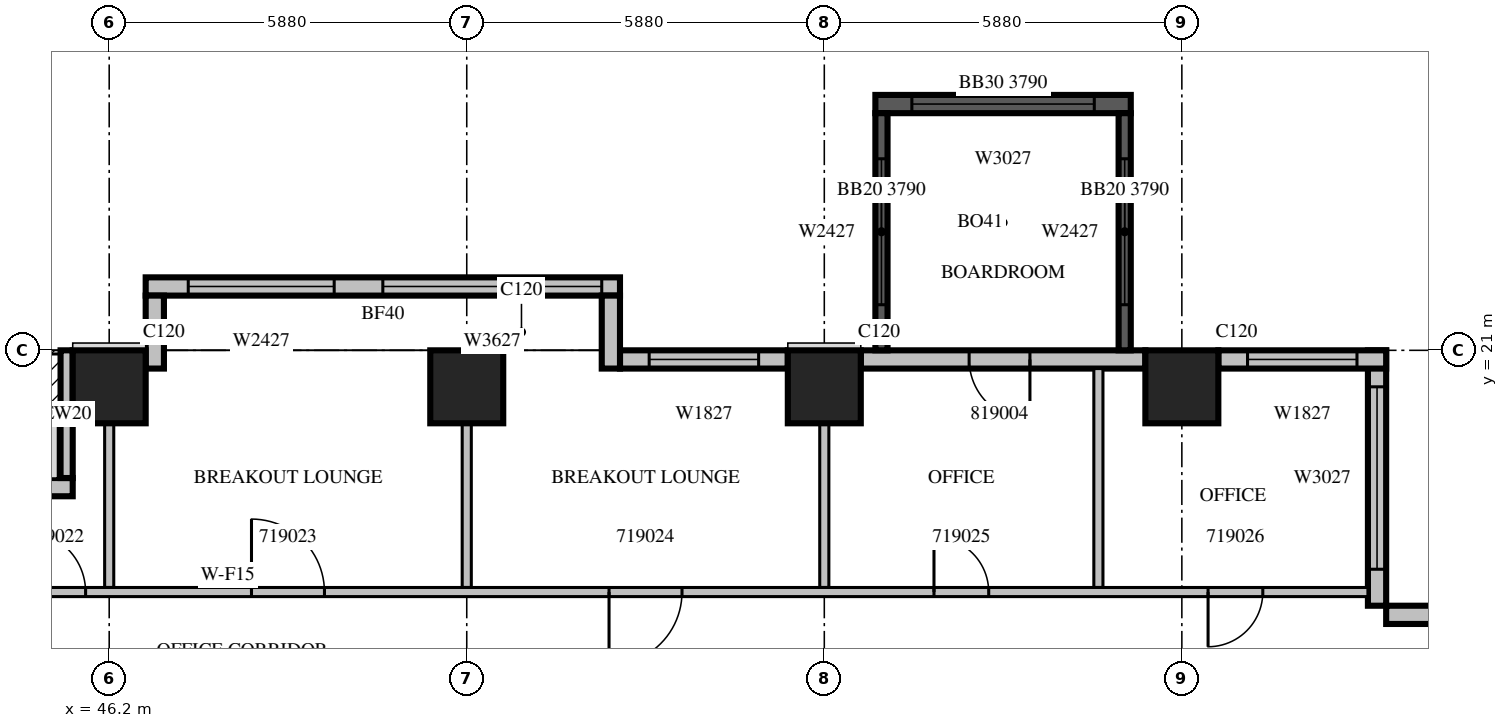
"""IFC4 building model, lengths in metres.
Left out: names, types, materials, properties, quantities, classifications, styles, units other than length and angle.
Written with IfcOpenShell. Run it as: python <this file> out.ifc"""

import sys

from ifc_helpers import new_model, si_unit, direction, frame, frame_2d, origin, origin_2d, place, context, subcontext, project, spatial, rectangle, extrude, source, transform, mapped, element, fill, save


model = new_model("IFC4")
c1 = context("Model", 3, precision=1e-05, world=origin(), true_north=direction((0.0, 1.0)))
c2 = subcontext(c1, "Body", "Model", "MODEL_VIEW")
j1 = project(units=[si_unit("LENGTHUNIT", "METRE"), si_unit("PLANEANGLEUNIT", "RADIAN")], contexts=[c1])
p1 = place(None, origin())
s1 = spatial("IfcSite", under=j1, at=p1, CompositionType="ELEMENT")
p2 = place(p1, origin())
s2 = spatial("IfcBuilding", under=s1, at=p2, CompositionType="ELEMENT")
p3 = place(p2, frame((0.0, 0.0, 90.9)))
s3 = spatial("IfcBuildingStorey", under=s2, at=p3, CompositionType="ELEMENT", Elevation=90.9)
m1 = source(origin(), c2, "Body", "SweptSolid", [
    extrude(rectangle(XDim=1.2, YDim=1.2, at=origin_2d()), origin(), (0.0, 0.0, 1.0), 4.2),
])
for number, where, z_axis, x_axis in (
    (1, (46.2, 20.4, 0.0), (0.0, 0.0, 1.0), (1.0, 0.0, 0.0)),
    (2, (52.08, 20.4, 0.0), (0.0, 0.0, 1.0), (1.0, 0.0, 0.0)),
    (3, (57.96, 20.4, 0.0), (0.0, 0.0, 1.0), (1.0, 0.0, 0.0)),
    (4, (63.84, 20.4, 0.0), (0.0, 0.0, 1.0), (1.0, 0.0, 0.0)),
):
    element("IfcColumn", number, at=place(p3, frame(where, z_axis=z_axis, x_axis=x_axis)), inside=s3, PredefinedType="COLUMN", context=c2, shape_type="MappedRepresentation", body=[
        mapped(m1, transform((0.0, 0.0, 0.0), scale=1.0)),
    ])
m2 = source(origin(), c2, "Body", "SweptSolid", [
    extrude(rectangle(XDim=4.2, YDim=0.3, at=frame_2d((2.1, 0.0))), origin(), (0.0, 0.0, 1.0), 3.8),
])
p4 = place(p3, frame((71.4, 16.65, 0.0), z_axis=(0.0, 0.0, 1.0), x_axis=(-1.0, 0.0, 0.0)))
e5 = element("IfcWall", 5, at=p4, inside=s3, PredefinedType="STANDARD", context=c2, shape_type="MappedRepresentation", body=[
    mapped(m2, transform((0.0, 0.0, 0.0), scale=1.0)),
])
m3 = source(origin(), c2, "Body", "SweptSolid", [
    extrude(rectangle(XDim=1.2, YDim=2.7, at=frame_2d((0.6, 1.35))), frame((0.0, 0.16, 0.0), z_axis=(0.0, -1.0, 0.0), x_axis=(1.0, 0.0, 0.0)), (0.0, 0.0, 1.0), 0.32),
])
p5 = place(p4, frame((0.66, 0.0, 0.6)))
e6 = element("IfcOpeningElement", 6, at=p5, cuts=e5, PredefinedType="OPENING", context=c2, shape_type="MappedRepresentation", body=[
    mapped(m3, transform((0.0, 0.0, 0.0), scale=1.0)),
])
p6 = place(p3, frame((67.05, 16.8, 0.0), z_axis=(0.0, 0.0, 1.0), x_axis=(0.0, 1.0, 0.0)))
e7 = element("IfcWall", 7, at=p6, inside=s3, PredefinedType="STANDARD", context=c2, shape_type="MappedRepresentation", body=[
    mapped(m2, transform((0.0, 0.0, 0.0), scale=1.0)),
])
m4 = source(origin(), c2, "Body", "SweptSolid", [
    extrude(rectangle(XDim=3.0, YDim=2.7, at=frame_2d((1.5, 1.35))), frame((0.0, 0.16, 0.0), z_axis=(0.0, -1.0, 0.0), x_axis=(1.0, 0.0, 0.0)), (0.0, 0.0, 1.0), 0.32),
])
p7 = place(p6, frame((0.6, 0.0, 0.6)))
e8 = element("IfcOpeningElement", 8, at=p7, cuts=e7, PredefinedType="OPENING", context=c2, shape_type="MappedRepresentation", body=[
    mapped(m4, transform((0.0, 0.0, 0.0), scale=1.0)),
])
m5 = source(origin(), c2, "Body", "SweptSolid", [
    extrude(rectangle(XDim=2.76, YDim=0.3, at=frame_2d((1.38, 0.0))), origin(), (0.0, 0.0, 1.0), 3.8),
])
p8 = place(p3, frame((67.2, 20.85, 0.0), z_axis=(0.0, 0.0, 1.0), x_axis=(-1.0, 0.0, 0.0)))
e9 = element("IfcWall", 9, at=p8, inside=s3, PredefinedType="STANDARD", context=c2, shape_type="MappedRepresentation", body=[
    mapped(m5, transform((0.0, 0.0, 0.0), scale=1.0)),
])
m6 = source(origin(), c2, "Body", "SweptSolid", [
    extrude(rectangle(XDim=1.8, YDim=2.7, at=frame_2d((0.9, 1.35))), frame((0.0, 0.16, 0.0), z_axis=(0.0, -1.0, 0.0), x_axis=(1.0, 0.0, 0.0)), (0.0, 0.0, 1.0), 0.32),
])
p9 = place(p8, frame((0.48, 0.0, 0.6)))
e10 = element("IfcOpeningElement", 10, at=p9, cuts=e9, PredefinedType="OPENING", context=c2, shape_type="MappedRepresentation", body=[
    mapped(m6, transform((0.0, 0.0, 0.0), scale=1.0)),
])
m7 = source(origin(), c2, "Body", "SweptSolid", [
    extrude(rectangle(XDim=4.68, YDim=0.3, at=frame_2d((2.34, 0.0))), origin(), (0.0, 0.0, 1.0), 3.8),
])
p10 = place(p3, frame((63.24, 20.85, 0.0), z_axis=(0.0, 0.0, 1.0), x_axis=(-1.0, 0.0, 0.0)))
e11 = element("IfcWall", 11, at=p10, inside=s3, PredefinedType="STANDARD", context=c2, shape_type="MappedRepresentation", body=[
    mapped(m7, transform((0.0, 0.0, 0.0), scale=1.0)),
])
m8 = source(origin(), c2, "Body", "SweptSolid", [
    extrude(rectangle(XDim=1.0, YDim=2.1, at=frame_2d((0.5, 1.05))), frame((0.0, 0.16, 0.0), z_axis=(0.0, -1.0, 0.0), x_axis=(1.0, 0.0, 0.0)), (0.0, 0.0, 1.0), 0.32),
])
p11 = place(p10, frame((1.898, 0.0, 0.0)))
e12 = element("IfcOpeningElement", 12, at=p11, cuts=e11, PredefinedType="OPENING", context=c2, shape_type="MappedRepresentation", body=[
    mapped(m8, transform((0.0, 0.0, 0.0), scale=1.0)),
])
p12 = place(p3, frame((57.36, 20.85, 0.0), z_axis=(0.0, 0.0, 1.0), x_axis=(-1.0, 0.0, 0.0)))
e13 = element("IfcWall", 13, at=p12, inside=s3, PredefinedType="STANDARD", context=c2, shape_type="MappedRepresentation", body=[
    mapped(m5, transform((0.0, 0.0, 0.0), scale=1.0)),
])
p13 = place(p12, frame((0.48, 0.0, 0.6)))
e14 = element("IfcOpeningElement", 14, at=p13, cuts=e13, PredefinedType="OPENING", context=c2, shape_type="MappedRepresentation", body=[
    mapped(m6, transform((0.0, 0.0, 0.0), scale=1.0)),
])
p14 = place(p3, frame((54.6, 22.05, 0.0), z_axis=(0.0, 0.0, 1.0), x_axis=(-1.0, 0.0, 0.0)))
e15 = element("IfcWall", 15, at=p14, inside=s3, PredefinedType="STANDARD", context=c2, shape_type="SweptSolid", body=[
    extrude(rectangle(XDim=7.8, YDim=0.3, at=frame_2d((3.9, 0.0))), origin(), (0.0, 0.0, 1.0), 3.8),
])
m9 = source(origin(), c2, "Body", "SweptSolid", [
    extrude(rectangle(XDim=3.6, YDim=2.7, at=frame_2d((1.8, 1.35))), frame((0.0, 0.16, 0.0), z_axis=(0.0, -1.0, 0.0), x_axis=(1.0, 0.0, 0.0)), (0.0, 0.0, 1.0), 0.32),
])
p15 = place(p14, frame((0.3, 0.0, 0.6)))
e16 = element("IfcOpeningElement", 16, at=p15, cuts=e15, PredefinedType="OPENING", context=c2, shape_type="MappedRepresentation", body=[
    mapped(m9, transform((0.0, 0.0, 0.0), scale=1.0)),
])
m10 = source(origin(), c2, "Body", "SweptSolid", [
    extrude(rectangle(XDim=2.4, YDim=2.7, at=frame_2d((1.2, 1.35))), frame((0.0, 0.16, 0.0), z_axis=(0.0, -1.0, 0.0), x_axis=(1.0, 0.0, 0.0)), (0.0, 0.0, 1.0), 0.32),
])
p16 = place(p14, frame((4.7, 0.0, 0.6)))
e17 = element("IfcOpeningElement", 17, at=p16, cuts=e15, PredefinedType="OPENING", context=c2, shape_type="MappedRepresentation", body=[
    mapped(m10, transform((0.0, 0.0, 0.0), scale=1.0)),
])
m11 = source(origin(), c2, "Body", "SweptSolid", [
    extrude(rectangle(XDim=1.2, YDim=0.3, at=frame_2d((0.6, 0.0))), origin(), (0.0, 0.0, 1.0), 3.8),
])
for number, where, z_axis, x_axis in (
    (18, (54.45, 20.7, 0.0), (0.0, 0.0, 1.0), (0.0, 1.0, 0.0)),
    (19, (46.95, 20.7, 0.0), (0.0, 0.0, 1.0), (0.0, 1.0, 0.0)),
):
    element("IfcWall", number, at=place(p3, frame(where, z_axis=z_axis, x_axis=x_axis)), inside=s3, PredefinedType="STANDARD", context=c2, shape_type="MappedRepresentation", body=[
        mapped(m11, transform((0.0, 0.0, 0.0), scale=1.0)),
    ])
m12 = source(origin(), c2, "Body", "SweptSolid", [
    extrude(rectangle(XDim=3.6, YDim=0.3, at=frame_2d((1.8, 0.0))), origin(), (0.0, 0.0, 1.0), 3.8),
])
p17 = place(p3, frame((45.6, 18.75, 0.0), z_axis=(0.0, 0.0, 1.0), x_axis=(-1.0, 0.0, 0.0)))
e20 = element("IfcWall", 20, at=p17, inside=s3, PredefinedType="STANDARD", context=c2, shape_type="MappedRepresentation", body=[
    mapped(m12, transform((0.0, 0.0, 0.0), scale=1.0)),
])
m13 = source(origin(), c2, "Body", "SweptSolid", [
    extrude(rectangle(XDim=1.8, YDim=2.4, at=frame_2d((0.9, 1.2))), frame((0.0, 0.16, 0.0), z_axis=(0.0, -1.0, 0.0), x_axis=(1.0, 0.0, 0.0)), (0.0, 0.0, 1.0), 0.32),
])
p18 = place(p17, frame((1.5, 0.0, 0.0)))
e21 = element("IfcOpeningElement", 21, at=p18, cuts=e20, PredefinedType="OPENING", context=c2, shape_type="MappedRepresentation", body=[
    mapped(m13, transform((0.0, 0.0, 0.0), scale=1.0)),
])
m14 = source(origin(), c2, "Body", "SweptSolid", [
    extrude(rectangle(XDim=2.1, YDim=0.2, at=frame_2d((1.05, 0.0))), origin(), (0.0, 0.0, 1.0), 3.8),
])
p19 = place(p3, frame((45.5, 21.0, 0.0), z_axis=(0.0, 0.0, 1.0), x_axis=(0.0, -1.0, 0.0)))
e22 = element("IfcWall", 22, at=p19, inside=s3, PredefinedType="STANDARD", context=c2, shape_type="MappedRepresentation", body=[
    mapped(m14, transform((0.0, 0.0, 0.0), scale=1.0)),
])
m15 = source(origin(), c2, "Body", "SweptSolid", [
    extrude(rectangle(XDim=4.2, YDim=0.3, at=frame_2d((2.1, 0.0))), origin(), (0.0, 0.0, 1.0), 3.79),
])
p20 = place(p3, frame((63.0, 25.05, 0.0), z_axis=(0.0, 0.0, 1.0), x_axis=(-1.0, 0.0, 0.0)))
e23 = element("IfcWall", 23, at=p20, inside=s3, PredefinedType="SOLIDWALL", context=c2, shape_type="MappedRepresentation", body=[
    mapped(m15, transform((0.0, 0.0, 0.0), scale=1.0)),
])
p21 = place(p20, frame((0.6, 0.0, 0.6)))
e24 = element("IfcOpeningElement", 24, at=p21, cuts=e23, PredefinedType="OPENING", context=c2, shape_type="MappedRepresentation", body=[
    mapped(m4, transform((0.0, 0.0, 0.0), scale=1.0)),
])
m16 = source(origin(), c2, "Body", "SweptSolid", [
    extrude(rectangle(XDim=3.9, YDim=0.2, at=frame_2d((1.95, 0.0))), origin(), (0.0, 0.0, 1.0), 3.79),
])
p22 = place(p3, frame((62.9, 21.0, 0.0), z_axis=(0.0, 0.0, 1.0), x_axis=(0.0, 1.0, 0.0)))
e25 = element("IfcWall", 25, at=p22, inside=s3, PredefinedType="SOLIDWALL", context=c2, shape_type="MappedRepresentation", body=[
    mapped(m16, transform((0.0, 0.0, 0.0), scale=1.0)),
])
m17 = source(origin(), c2, "Body", "SweptSolid", [
    extrude(rectangle(XDim=2.4, YDim=2.7, at=frame_2d((1.2, 1.35))), frame((0.0, 0.11, 0.0), z_axis=(0.0, -1.0, 0.0), x_axis=(1.0, 0.0, 0.0)), (0.0, 0.0, 1.0), 0.22),
])
p23 = place(p22, frame((0.75, 0.0, 0.6)))
e26 = element("IfcOpeningElement", 26, at=p23, cuts=e25, PredefinedType="OPENING", context=c2, shape_type="MappedRepresentation", body=[
    mapped(m17, transform((0.0, 0.0, 0.0), scale=1.0)),
])
p24 = place(p3, frame((58.9, 21.0, 0.0), z_axis=(0.0, 0.0, 1.0), x_axis=(0.0, 1.0, 0.0)))
e27 = element("IfcWall", 27, at=p24, inside=s3, PredefinedType="SOLIDWALL", context=c2, shape_type="MappedRepresentation", body=[
    mapped(m16, transform((0.0, 0.0, 0.0), scale=1.0)),
])
p25 = place(p24, frame((0.75, 0.0, 0.6)))
e28 = element("IfcOpeningElement", 28, at=p25, cuts=e27, PredefinedType="OPENING", context=c2, shape_type="MappedRepresentation", body=[
    mapped(m17, transform((0.0, 0.0, 0.0), scale=1.0)),
])
m18 = source(origin(), c2, "Body", "SweptSolid", [
    extrude(rectangle(XDim=2.701, YDim=0.15, at=frame_2d((1.351, 0.0))), origin(), (0.0, 0.0, 1.0), 3.8),
])
p26 = place(p3, frame((52.08, 19.801, 0.0), z_axis=(0.0, 0.0, 1.0), x_axis=(0.0, -1.0, 0.0)))
e29 = element("IfcWall", 29, at=p26, inside=s3, PredefinedType="PARTITIONING", context=c2, shape_type="MappedRepresentation", body=[
    mapped(m18, transform((0.0, 0.0, 0.0), scale=1.0)),
])
m19 = source(origin(), c2, "Body", "SweptSolid", [
    extrude(rectangle(XDim=3.6, YDim=0.15, at=frame_2d((1.8, 0.0))), origin(), (0.0, 0.0, 1.0), 3.8),
])
p27 = place(p3, frame((62.468, 20.7, 0.0), z_axis=(0.0, 0.0, 1.0), x_axis=(0.0, -1.0, 0.0)))
e30 = element("IfcWall", 30, at=p27, inside=s3, PredefinedType="PARTITIONING", context=c2, shape_type="MappedRepresentation", body=[
    mapped(m19, transform((0.0, 0.0, 0.0), scale=1.0)),
])
for number, where, z_axis, x_axis in (
    (31, (46.2, 17.1, 0.0), (0.0, 0.0, 1.0), (0.0, 1.0, 0.0)),
    (32, (57.96, 17.1, 0.0), (0.0, 0.0, 1.0), (0.0, 1.0, 0.0)),
):
    element("IfcWall", number, at=place(p3, frame(where, z_axis=z_axis, x_axis=x_axis)), inside=s3, PredefinedType="PARTITIONING", context=c2, shape_type="MappedRepresentation", body=[
        mapped(m18, transform((0.0, 0.0, 0.0), scale=1.0)),
    ])
m20 = source(origin(), c2, "Body", "SweptSolid", [
    extrude(rectangle(XDim=37.5, YDim=0.15, at=frame_2d((18.75, 0.0))), origin(), (0.0, 0.0, 1.0), 3.8),
])
p28 = place(p3, frame((29.4, 17.025, 0.0), z_axis=(0.0, 0.0, 1.0), x_axis=(1.0, 0.0, 0.0)))
e33 = element("IfcWall", 33, at=p28, inside=s3, PredefinedType="PARTITIONING", context=c2, shape_type="MappedRepresentation", body=[
    mapped(m20, transform((0.0, 0.0, 0.0), scale=1.0)),
])
m21 = source(origin(), c2, "Body", "SweptSolid", [
    extrude(rectangle(XDim=1.0, YDim=2.1, at=frame_2d((0.5, 1.05))), frame((0.0, 0.085, 0.0), z_axis=(0.0, -1.0, 0.0), x_axis=(1.0, 0.0, 0.0)), (0.0, 0.0, 1.0), 0.17),
])
p29 = place(p28, frame((1.357, 0.0, 0.0)))
e34 = element("IfcOpeningElement", 34, at=p29, cuts=e33, PredefinedType="OPENING", context=c2, shape_type="MappedRepresentation", body=[
    mapped(m21, transform((0.0, 0.0, 0.0), scale=1.0)),
])
p30 = place(p28, frame((4.669, 0.0, 0.0)))
e35 = element("IfcOpeningElement", 35, at=p30, cuts=e33, PredefinedType="OPENING", context=c2, shape_type="MappedRepresentation", body=[
    mapped(m21, transform((0.0, 0.0, 0.0), scale=1.0)),
])
p31 = place(p28, frame((7.012, 0.0, 0.0)))
e36 = element("IfcOpeningElement", 36, at=p31, cuts=e33, PredefinedType="OPENING", context=c2, shape_type="MappedRepresentation", body=[
    mapped(m21, transform((0.0, 0.0, 0.0), scale=1.0)),
])
p32 = place(p28, frame((9.757, 0.0, 0.0)))
e37 = element("IfcOpeningElement", 37, at=p32, cuts=e33, PredefinedType="OPENING", context=c2, shape_type="MappedRepresentation", body=[
    mapped(m21, transform((0.0, 0.0, 0.0), scale=1.0)),
])
p33 = place(p28, frame((13.069, 0.0, 0.0)))
e38 = element("IfcOpeningElement", 38, at=p33, cuts=e33, PredefinedType="OPENING", context=c2, shape_type="MappedRepresentation", body=[
    mapped(m21, transform((0.0, 0.0, 0.0), scale=1.0)),
])
p34 = place(p28, frame((15.412, 0.0, 0.0)))
e39 = element("IfcOpeningElement", 39, at=p34, cuts=e33, PredefinedType="OPENING", context=c2, shape_type="MappedRepresentation", body=[
    mapped(m21, transform((0.0, 0.0, 0.0), scale=1.0)),
])
m22 = source(origin(), c2, "Body", "SweptSolid", [
    extrude(rectangle(XDim=1.2, YDim=2.1, at=frame_2d((0.6, 1.05))), frame((0.0, 0.085, 0.0), z_axis=(0.0, -1.0, 0.0), x_axis=(1.0, 0.0, 0.0)), (0.0, 0.0, 1.0), 0.17),
])
p35 = place(p28, frame((19.14, 0.0, 0.0)))
e40 = element("IfcOpeningElement", 40, at=p35, cuts=e33, PredefinedType="OPENING", context=c2, shape_type="MappedRepresentation", body=[
    mapped(m22, transform((0.0, 0.0, 0.0), scale=1.0)),
])
p36 = place(p28, frame((25.02, 0.0, 0.0)))
e41 = element("IfcOpeningElement", 41, at=p36, cuts=e33, PredefinedType="OPENING", context=c2, shape_type="MappedRepresentation", body=[
    mapped(m22, transform((0.0, 0.0, 0.0), scale=1.0)),
])
m23 = source(origin(), c2, "Body", "SweptSolid", [
    extrude(rectangle(XDim=0.9, YDim=2.1, at=frame_2d((0.45, 1.05))), frame((0.0, 0.085, 0.0), z_axis=(0.0, -1.0, 0.0), x_axis=(1.0, 0.0, 0.0)), (0.0, 0.0, 1.0), 0.17),
])
p37 = place(p28, frame((30.364, 0.0, 0.0)))
e42 = element("IfcOpeningElement", 42, at=p37, cuts=e33, PredefinedType="OPENING", context=c2, shape_type="MappedRepresentation", body=[
    mapped(m23, transform((0.0, 0.0, 0.0), scale=1.0)),
])
p38 = place(p28, frame((34.871, 0.0, 0.0)))
e43 = element("IfcOpeningElement", 43, at=p38, cuts=e33, PredefinedType="OPENING", context=c2, shape_type="MappedRepresentation", body=[
    mapped(m23, transform((0.0, 0.0, 0.0), scale=1.0)),
])
m24 = source(origin(), c2, "Body", "SweptSolid", [
    extrude(rectangle(XDim=3.0, YDim=2.7, at=frame_2d((1.5, 1.35))), frame((0.0, 0.03, 0.0), z_axis=(0.0, -1.0, 0.0), x_axis=(1.0, 0.0, 0.0)), (0.0, 0.0, 1.0), 0.06),
])
p39 = place(p7, origin())
e44 = element("IfcWindow", 44, at=p39, inside=s3, PartitioningType="SINGLE_PANEL", PredefinedType="WINDOW", context=c2, shape_type="MappedRepresentation", body=[
    mapped(m24, transform((0.0, 0.0, 0.0), scale=1.0)),
])
fill(e8, e44)
m25 = source(origin(), c2, "Body", "SweptSolid", [
    extrude(rectangle(XDim=1.8, YDim=2.7, at=frame_2d((0.9, 1.35))), frame((0.0, 0.03, 0.0), z_axis=(0.0, -1.0, 0.0), x_axis=(1.0, 0.0, 0.0)), (0.0, 0.0, 1.0), 0.06),
])
p40 = place(p9, origin())
e45 = element("IfcWindow", 45, at=p40, inside=s3, PartitioningType="SINGLE_PANEL", PredefinedType="WINDOW", context=c2, shape_type="MappedRepresentation", body=[
    mapped(m25, transform((0.0, 0.0, 0.0), scale=1.0)),
])
fill(e10, e45)
p41 = place(p13, origin())
e46 = element("IfcWindow", 46, at=p41, inside=s3, PartitioningType="SINGLE_PANEL", PredefinedType="WINDOW", context=c2, shape_type="MappedRepresentation", body=[
    mapped(m25, transform((0.0, 0.0, 0.0), scale=1.0)),
])
fill(e14, e46)
m26 = source(origin(), c2, "Body", "SweptSolid", [
    extrude(rectangle(XDim=3.6, YDim=2.7, at=frame_2d((1.8, 1.35))), frame((0.0, 0.03, 0.0), z_axis=(0.0, -1.0, 0.0), x_axis=(1.0, 0.0, 0.0)), (0.0, 0.0, 1.0), 0.06),
])
p42 = place(p15, origin())
e47 = element("IfcWindow", 47, at=p42, inside=s3, PartitioningType="SINGLE_PANEL", PredefinedType="WINDOW", context=c2, shape_type="MappedRepresentation", body=[
    mapped(m26, transform((0.0, 0.0, 0.0), scale=1.0)),
])
fill(e16, e47)
m27 = source(origin(), c2, "Body", "SweptSolid", [
    extrude(rectangle(XDim=2.4, YDim=2.7, at=frame_2d((1.2, 1.35))), frame((0.0, 0.03, 0.0), z_axis=(0.0, -1.0, 0.0), x_axis=(1.0, 0.0, 0.0)), (0.0, 0.0, 1.0), 0.06),
])
p43 = place(p16, origin())
e48 = element("IfcWindow", 48, at=p43, inside=s3, PartitioningType="SINGLE_PANEL", PredefinedType="WINDOW", context=c2, shape_type="MappedRepresentation", body=[
    mapped(m27, transform((0.0, 0.0, 0.0), scale=1.0)),
])
fill(e17, e48)
p44 = place(p21, origin())
e49 = element("IfcWindow", 49, at=p44, inside=s3, PartitioningType="SINGLE_PANEL", PredefinedType="WINDOW", context=c2, shape_type="MappedRepresentation", body=[
    mapped(m24, transform((0.0, 0.0, 0.0), scale=1.0)),
])
fill(e24, e49)
p45 = place(p23, origin())
e50 = element("IfcWindow", 50, at=p45, inside=s3, PartitioningType="SINGLE_PANEL", PredefinedType="WINDOW", context=c2, shape_type="MappedRepresentation", body=[
    mapped(m27, transform((0.0, 0.0, 0.0), scale=1.0)),
])
fill(e26, e50)
p46 = place(p25, origin())
e51 = element("IfcWindow", 51, at=p46, inside=s3, PartitioningType="SINGLE_PANEL", PredefinedType="WINDOW", context=c2, shape_type="MappedRepresentation", body=[
    mapped(m27, transform((0.0, 0.0, 0.0), scale=1.0)),
])
fill(e28, e51)
m28 = source(origin(), c2, "Body", "SweptSolid", [
    extrude(rectangle(XDim=1.0, YDim=2.1, at=frame_2d((0.5, 1.05))), frame((0.0, 0.025, 0.0), z_axis=(0.0, -1.0, 0.0), x_axis=(1.0, 0.0, 0.0)), (0.0, 0.0, 1.0), 0.05),
])
p47 = place(p34, origin())
e52 = element("IfcDoor", 52, at=p47, inside=s3, OperationType="SINGLE_SWING_LEFT", PredefinedType="DOOR", context=c2, shape_type="MappedRepresentation", body=[
    mapped(m28, transform((0.0, 0.0, 0.0), scale=1.0)),
])
fill(e39, e52)
m29 = source(origin(), c2, "Body", "SweptSolid", [
    extrude(rectangle(XDim=1.2, YDim=2.1, at=frame_2d((0.6, 1.05))), frame((0.0, 0.025, 0.0), z_axis=(0.0, -1.0, 0.0), x_axis=(1.0, 0.0, 0.0)), (0.0, 0.0, 1.0), 0.05),
])
p48 = place(p35, origin())
e53 = element("IfcDoor", 53, at=p48, inside=s3, OperationType="SINGLE_SWING_LEFT", PredefinedType="DOOR", context=c2, shape_type="MappedRepresentation", body=[
    mapped(m29, transform((0.0, 0.0, 0.0), scale=1.0)),
])
fill(e40, e53)
p49 = place(p36, origin())
e54 = element("IfcDoor", 54, at=p49, inside=s3, OperationType="SINGLE_SWING_RIGHT", PredefinedType="DOOR", context=c2, shape_type="MappedRepresentation", body=[
    mapped(m29, transform((0.0, 0.0, 0.0), scale=1.0)),
])
fill(e41, e54)
m30 = source(origin(), c2, "Body", "SweptSolid", [
    extrude(rectangle(XDim=0.9, YDim=2.1, at=frame_2d((0.45, 1.05))), frame((0.0, 0.025, 0.0), z_axis=(0.0, -1.0, 0.0), x_axis=(1.0, 0.0, 0.0)), (0.0, 0.0, 1.0), 0.05),
])
p50 = place(p37, origin())
e55 = element("IfcDoor", 55, at=p50, inside=s3, OperationType="SINGLE_SWING_LEFT", PredefinedType="DOOR", context=c2, shape_type="MappedRepresentation", body=[
    mapped(m30, transform((0.0, 0.0, 0.0), scale=1.0)),
])
fill(e42, e55)
p51 = place(p38, origin())
e56 = element("IfcDoor", 56, at=p51, inside=s3, OperationType="SINGLE_SWING_RIGHT", PredefinedType="DOOR", context=c2, shape_type="MappedRepresentation", body=[
    mapped(m30, transform((0.0, 0.0, 0.0), scale=1.0)),
])
fill(e43, e56)
p52 = place(p11, origin())
e57 = element("IfcDoor", 57, at=p52, inside=s3, OperationType="SINGLE_SWING_LEFT", PredefinedType="DOOR", context=c2, shape_type="MappedRepresentation", body=[
    mapped(m28, transform((0.0, 0.0, 0.0), scale=1.0)),
])
fill(e12, e57)
save(model, sys.argv[1])
